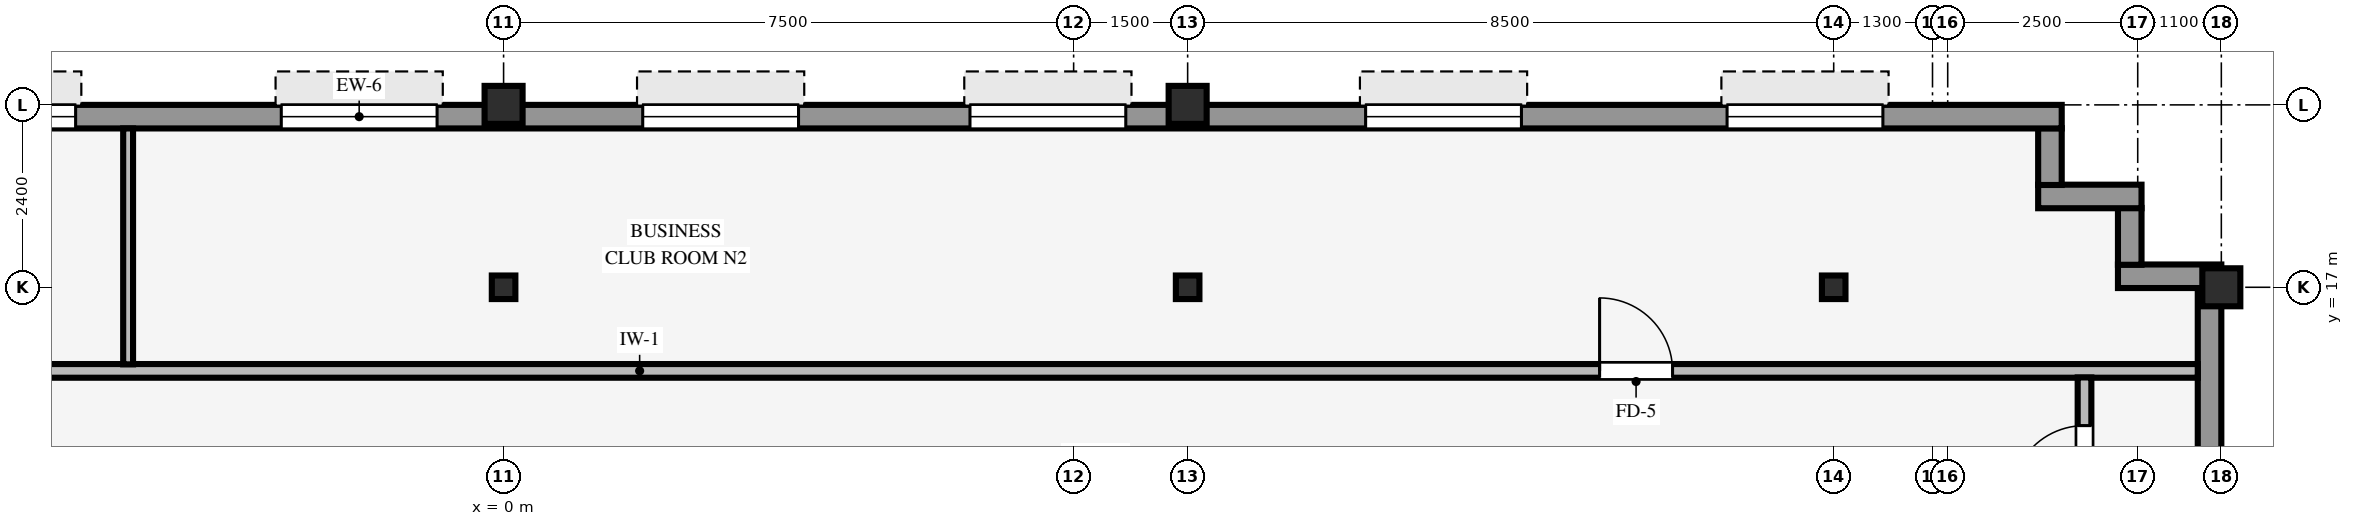
"""IFC4 building model, lengths in metres.
Left out: names, types, materials, properties, quantities, classifications, styles, units other than length and angle.
Written with IfcOpenShell. Run it as: python <this file> out.ifc"""

import sys

from ifc_helpers import new_model, si_unit, direction, frame, frame_2d, origin, origin_2d, place, context, subcontext, project, spatial, rectangle, hollow_rectangle, i_section, extrude, source, transform, mapped, element, fill, save


model = new_model("IFC4")
c1 = context("Model", 3, precision=1e-05, world=origin(), true_north=direction((0.0, 1.0)))
c2 = subcontext(c1, "Body", "Model", "MODEL_VIEW")
j1 = project(units=[si_unit("LENGTHUNIT", "METRE"), si_unit("PLANEANGLEUNIT", "RADIAN")], contexts=[c1])
p1 = place(None, origin())
s1 = spatial("IfcSite", under=j1, at=p1, CompositionType="ELEMENT")
p2 = place(p1, origin())
s2 = spatial("IfcBuilding", under=s1, at=p2, CompositionType="ELEMENT")
p3 = place(p2, frame((0.0, 0.0, 198.2)))
s3 = spatial("IfcBuildingStorey", under=s2, at=p3, CompositionType="ELEMENT", Elevation=198.2)
for number, where, z_axis, x_axis in (
    (1, (22.6, 17.0, 0.0), (0.0, 0.0, 1.0), (1.0, 0.0, 0.0)),
    (2, (0.0, 19.4, 0.0), (0.0, 0.0, 1.0), (1.0, 0.0, 0.0)),
    (3, (9.0, 19.4, 0.0), (0.0, 0.0, 1.0), (1.0, 0.0, 0.0)),
):
    element("IfcColumn", number, at=place(p3, frame(where, z_axis=z_axis, x_axis=x_axis)), inside=s3, PredefinedType="COLUMN", context=c2, shape_type="SweptSolid", body=[
        extrude(hollow_rectangle(XDim=0.5, YDim=0.5, WallThickness=0.032, InnerFilletRadius=0.032, OuterFilletRadius=0.064, at=origin_2d()), origin(), (0.0, 0.0, 1.0), 3.37),
    ])
for number, where, z_axis, x_axis in (
    (4, (0.0, 17.0, 0.0), (0.0, 0.0, 1.0), (1.0, 0.0, 0.0)),
    (5, (9.0, 17.0, 0.0), (0.0, 0.0, 1.0), (1.0, 0.0, 0.0)),
    (6, (17.5, 17.0, 0.0), (0.0, 0.0, 1.0), (1.0, 0.0, 0.0)),
):
    element("IfcColumn", number, at=place(p3, frame(where, z_axis=z_axis, x_axis=x_axis)), inside=s3, PredefinedType="COLUMN", context=c2, shape_type="SweptSolid", body=[
        extrude(i_section(OverallWidth=0.31, OverallDepth=0.31, WebThickness=0.015, FlangeThickness=0.015, FilletRadius=0.015, at=origin_2d()), origin(), (0.0, 0.0, 1.0), 3.37),
    ])
p4 = place(p3, frame((22.445, -20.794, 0.0), z_axis=(0.0, 0.0, 1.0), x_axis=(0.0, 1.0, 0.0)))
e7 = element("IfcWall", 7, at=p4, inside=s3, PredefinedType="STANDARD", context=c2, shape_type="SweptSolid", body=[
    extrude(rectangle(XDim=37.788, YDim=0.31, at=frame_2d((18.894, 0.0))), origin(), (0.0, 0.0, 1.0), 2.705),
])
p5 = place(p4, frame((16.474, 0.0, 0.0), z_axis=(0.0, 0.0, 1.0), x_axis=(-1.0, 0.0, 0.0)))
e8 = element("IfcOpeningElement", 8, at=p5, cuts=e7, PredefinedType="OPENING", context=c2, shape_type="SweptSolid", body=[
    extrude(rectangle(XDim=0.98, YDim=2.15, at=frame_2d((0.49, 1.075))), frame((0.0, 0.165, 0.0), z_axis=(0.0, -1.0, 0.0), x_axis=(1.0, 0.0, 0.0)), (0.0, 0.0, 1.0), 0.33),
])
p6 = place(p4, frame((1.581, 0.0, 0.8)))
e9 = element("IfcOpeningElement", 9, at=p6, cuts=e7, PredefinedType="OPENING", context=c2, shape_type="SweptSolid", body=[
    extrude(rectangle(XDim=1.25, YDim=1.52, at=frame_2d((0.625, 0.76))), frame((0.0, 0.165, 0.0), z_axis=(0.0, -1.0, 0.0), x_axis=(1.0, 0.0, 0.0)), (0.0, 0.0, 1.0), 0.33),
])
p7 = place(p4, frame((8.044, 0.0, 0.8)))
e10 = element("IfcOpeningElement", 10, at=p7, cuts=e7, PredefinedType="OPENING", context=c2, shape_type="SweptSolid", body=[
    extrude(rectangle(XDim=1.25, YDim=1.52, at=frame_2d((0.625, 0.76))), frame((0.0, 0.165, 0.0), z_axis=(0.0, -1.0, 0.0), x_axis=(1.0, 0.0, 0.0)), (0.0, 0.0, 1.0), 0.33),
])
p8 = place(p4, frame((13.156, 0.0, 0.8)))
e11 = element("IfcOpeningElement", 11, at=p8, cuts=e7, PredefinedType="OPENING", context=c2, shape_type="SweptSolid", body=[
    extrude(rectangle(XDim=1.25, YDim=1.52, at=frame_2d((0.625, 0.76))), frame((0.0, 0.165, 0.0), z_axis=(0.0, -1.0, 0.0), x_axis=(1.0, 0.0, 0.0)), (0.0, 0.0, 1.0), 0.33),
])
p9 = place(p4, frame((18.269, 0.0, 0.8)))
e12 = element("IfcOpeningElement", 12, at=p9, cuts=e7, PredefinedType="OPENING", context=c2, shape_type="SweptSolid", body=[
    extrude(rectangle(XDim=1.25, YDim=1.52, at=frame_2d((0.625, 0.76))), frame((0.0, 0.165, 0.0), z_axis=(0.0, -1.0, 0.0), x_axis=(1.0, 0.0, 0.0)), (0.0, 0.0, 1.0), 0.33),
])
p10 = place(p4, frame((22.482, 0.0, 0.8)))
e13 = element("IfcOpeningElement", 13, at=p10, cuts=e7, PredefinedType="OPENING", context=c2, shape_type="SweptSolid", body=[
    extrude(rectangle(XDim=1.25, YDim=1.52, at=frame_2d((0.625, 0.76))), frame((0.0, 0.165, 0.0), z_axis=(0.0, -1.0, 0.0), x_axis=(1.0, 0.0, 0.0)), (0.0, 0.0, 1.0), 0.33),
])
p11 = place(p4, frame((28.044, 0.0, 0.8)))
e14 = element("IfcOpeningElement", 14, at=p11, cuts=e7, PredefinedType="OPENING", context=c2, shape_type="SweptSolid", body=[
    extrude(rectangle(XDim=1.25, YDim=1.52, at=frame_2d((0.625, 0.76))), frame((0.0, 0.165, 0.0), z_axis=(0.0, -1.0, 0.0), x_axis=(1.0, 0.0, 0.0)), (0.0, 0.0, 1.0), 0.33),
])
p12 = place(p4, frame((33.607, 0.0, 0.8)))
e15 = element("IfcOpeningElement", 15, at=p12, cuts=e7, PredefinedType="OPENING", context=c2, shape_type="SweptSolid", body=[
    extrude(rectangle(XDim=1.25, YDim=1.52, at=frame_2d((0.625, 0.76))), frame((0.0, 0.165, 0.0), z_axis=(0.0, -1.0, 0.0), x_axis=(1.0, 0.0, 0.0)), (0.0, 0.0, 1.0), 0.33),
])
p13 = place(p3, frame((21.24, 17.145, 0.0), z_axis=(0.0, 0.0, 1.0), x_axis=(1.0, 0.0, 0.0)))
e16 = element("IfcWall", 16, at=p13, inside=s3, PredefinedType="STANDARD", context=c2, shape_type="SweptSolid", body=[
    extrude(rectangle(XDim=1.36, YDim=0.31, at=frame_2d((0.68, 0.0))), origin(), (0.0, 0.0, 1.0), 2.816),
])
p14 = place(p3, frame((21.395, 17.296, 0.0), z_axis=(0.0, 0.0, 1.0), x_axis=(0.0, 1.0, 0.0)))
e17 = element("IfcWall", 17, at=p14, inside=s3, PredefinedType="STANDARD", context=c2, shape_type="SweptSolid", body=[
    extrude(rectangle(XDim=0.748, YDim=0.31, at=frame_2d((0.374, 0.0))), origin(), (0.0, 0.0, 1.0), 2.816),
])
p15 = place(p3, frame((20.19, 18.195, 0.0), z_axis=(0.0, 0.0, 1.0), x_axis=(1.0, 0.0, 0.0)))
e18 = element("IfcWall", 18, at=p15, inside=s3, PredefinedType="STANDARD", context=c2, shape_type="SweptSolid", body=[
    extrude(rectangle(XDim=1.36, YDim=0.31, at=frame_2d((0.68, 0.0))), origin(), (0.0, 0.0, 1.0), 2.816),
])
p16 = place(p3, frame((20.345, 18.346, 0.0), z_axis=(0.0, 0.0, 1.0), x_axis=(0.0, 1.0, 0.0)))
e19 = element("IfcWall", 19, at=p16, inside=s3, PredefinedType="STANDARD", context=c2, shape_type="SweptSolid", body=[
    extrude(rectangle(XDim=0.748, YDim=0.31, at=frame_2d((0.374, 0.0))), origin(), (0.0, 0.0, 1.0), 2.816),
])
p17 = place(p3, frame((-24.3, 19.245, 0.0), z_axis=(0.0, 0.0, 1.0), x_axis=(1.0, 0.0, 0.0)))
e20 = element("IfcWall", 20, at=p17, inside=s3, PredefinedType="STANDARD", context=c2, shape_type="SweptSolid", body=[
    extrude(rectangle(XDim=44.8, YDim=0.31, at=frame_2d((22.4, 0.0))), origin(), (0.0, 0.0, 1.0), 2.705),
])
p18 = place(p17, frame((2.353, 0.0, 0.8)))
e21 = element("IfcOpeningElement", 21, at=p18, cuts=e20, PredefinedType="OPENING", context=c2, shape_type="SweptSolid", body=[
    extrude(rectangle(XDim=2.05, YDim=1.52, at=frame_2d((1.025, 0.76))), frame((0.0, 0.165, 0.0), z_axis=(0.0, -1.0, 0.0), x_axis=(1.0, 0.0, 0.0)), (0.0, 0.0, 1.0), 0.33),
])
p19 = place(p17, frame((7.108, 0.0, 0.8)))
e22 = element("IfcOpeningElement", 22, at=p19, cuts=e20, PredefinedType="OPENING", context=c2, shape_type="SweptSolid", body=[
    extrude(rectangle(XDim=2.05, YDim=1.52, at=frame_2d((1.025, 0.76))), frame((0.0, 0.165, 0.0), z_axis=(0.0, -1.0, 0.0), x_axis=(1.0, 0.0, 0.0)), (0.0, 0.0, 1.0), 0.33),
])
p20 = place(p17, frame((11.864, 0.0, 0.8)))
e23 = element("IfcOpeningElement", 23, at=p20, cuts=e20, PredefinedType="OPENING", context=c2, shape_type="SweptSolid", body=[
    extrude(rectangle(XDim=2.05, YDim=1.52, at=frame_2d((1.025, 0.76))), frame((0.0, 0.165, 0.0), z_axis=(0.0, -1.0, 0.0), x_axis=(1.0, 0.0, 0.0)), (0.0, 0.0, 1.0), 0.33),
])
p21 = place(p17, frame((16.619, 0.0, 0.8)))
e24 = element("IfcOpeningElement", 24, at=p21, cuts=e20, PredefinedType="OPENING", context=c2, shape_type="SweptSolid", body=[
    extrude(rectangle(XDim=2.05, YDim=1.52, at=frame_2d((1.025, 0.76))), frame((0.0, 0.165, 0.0), z_axis=(0.0, -1.0, 0.0), x_axis=(1.0, 0.0, 0.0)), (0.0, 0.0, 1.0), 0.33),
])
p22 = place(p17, frame((21.375, 0.0, 0.8)))
e25 = element("IfcOpeningElement", 25, at=p22, cuts=e20, PredefinedType="OPENING", context=c2, shape_type="SweptSolid", body=[
    extrude(rectangle(XDim=2.05, YDim=1.52, at=frame_2d((1.025, 0.76))), frame((0.0, 0.165, 0.0), z_axis=(0.0, -1.0, 0.0), x_axis=(1.0, 0.0, 0.0)), (0.0, 0.0, 1.0), 0.33),
])
p23 = place(p17, frame((26.131, 0.0, 0.8)))
e26 = element("IfcOpeningElement", 26, at=p23, cuts=e20, PredefinedType="OPENING", context=c2, shape_type="SweptSolid", body=[
    extrude(rectangle(XDim=2.05, YDim=1.52, at=frame_2d((1.025, 0.76))), frame((0.0, 0.165, 0.0), z_axis=(0.0, -1.0, 0.0), x_axis=(1.0, 0.0, 0.0)), (0.0, 0.0, 1.0), 0.33),
])
p24 = place(p17, frame((30.436, 0.0, 0.8)))
e27 = element("IfcOpeningElement", 27, at=p24, cuts=e20, PredefinedType="OPENING", context=c2, shape_type="SweptSolid", body=[
    extrude(rectangle(XDim=2.05, YDim=1.52, at=frame_2d((1.025, 0.76))), frame((0.0, 0.165, 0.0), z_axis=(0.0, -1.0, 0.0), x_axis=(1.0, 0.0, 0.0)), (0.0, 0.0, 1.0), 0.33),
])
p25 = place(p17, frame((35.642, 0.0, 0.8)))
e28 = element("IfcOpeningElement", 28, at=p25, cuts=e20, PredefinedType="OPENING", context=c2, shape_type="SweptSolid", body=[
    extrude(rectangle(XDim=2.05, YDim=1.52, at=frame_2d((1.025, 0.76))), frame((0.0, 0.165, 0.0), z_axis=(0.0, -1.0, 0.0), x_axis=(1.0, 0.0, 0.0)), (0.0, 0.0, 1.0), 0.33),
])
p26 = place(p17, frame((40.397, 0.0, 0.8)))
e29 = element("IfcOpeningElement", 29, at=p26, cuts=e20, PredefinedType="OPENING", context=c2, shape_type="SweptSolid", body=[
    extrude(rectangle(XDim=2.05, YDim=1.52, at=frame_2d((1.025, 0.76))), frame((0.0, 0.165, 0.0), z_axis=(0.0, -1.0, 0.0), x_axis=(1.0, 0.0, 0.0)), (0.0, 0.0, 1.0), 0.33),
])
p27 = place(p3, frame((-26.09, 15.9, 0.0), z_axis=(0.0, 0.0, 1.0), x_axis=(1.0, 0.0, 0.0)))
e30 = element("IfcWall", 30, at=p27, inside=s3, PredefinedType="PARTITIONING", context=c2, shape_type="SweptSolid", body=[
    extrude(rectangle(XDim=48.38, YDim=0.18, at=frame_2d((24.19, 0.0))), origin(), (0.0, 0.0, 1.0), 3.36),
])
p28 = place(p27, frame((14.29, 0.0, 0.0)))
e31 = element("IfcOpeningElement", 31, at=p28, cuts=e30, PredefinedType="OPENING", context=c2, shape_type="SweptSolid", body=[
    extrude(rectangle(XDim=0.96, YDim=2.1, at=frame_2d((0.48, 1.05))), frame((0.0, 0.1, 0.0), z_axis=(0.0, -1.0, 0.0), x_axis=(1.0, 0.0, 0.0)), (0.0, 0.0, 1.0), 0.2),
])
p29 = place(p27, frame((40.51, 0.0, 0.0)))
e32 = element("IfcOpeningElement", 32, at=p29, cuts=e30, PredefinedType="OPENING", context=c2, shape_type="SweptSolid", body=[
    extrude(rectangle(XDim=0.96, YDim=2.1, at=frame_2d((0.48, 1.05))), frame((0.0, 0.1, 0.0), z_axis=(0.0, -1.0, 0.0), x_axis=(1.0, 0.0, 0.0)), (0.0, 0.0, 1.0), 0.2),
])
p30 = place(p3, frame((-4.94, 15.986, 0.0), z_axis=(0.0, 0.0, 1.0), x_axis=(0.0, 1.0, 0.0)))
e33 = element("IfcWall", 33, at=p30, inside=s3, PredefinedType="PARTITIONING", context=c2, shape_type="SweptSolid", body=[
    extrude(rectangle(XDim=3.104, YDim=0.13, at=frame_2d((1.552, 0.0))), origin(), (0.0, 0.0, 1.0), 3.36),
])
p31 = place(p3, frame((20.8, 13.586, 0.0), z_axis=(0.0, 0.0, 1.0), x_axis=(0.0, 1.0, 0.0)))
e34 = element("IfcWall", 34, at=p31, inside=s3, PredefinedType="PARTITIONING", context=c2, shape_type="SweptSolid", body=[
    extrude(rectangle(XDim=2.228, YDim=0.18, at=frame_2d((1.114, 0.0))), origin(), (0.0, 0.0, 1.0), 3.36),
])
p32 = place(p31, frame((0.634, 0.0, 0.0)))
e35 = element("IfcOpeningElement", 35, at=p32, cuts=e34, PredefinedType="OPENING", context=c2, shape_type="SweptSolid", body=[
    extrude(rectangle(XDim=0.96, YDim=2.1, at=frame_2d((0.48, 1.05))), frame((0.0, 0.1, 0.0), z_axis=(0.0, -1.0, 0.0), x_axis=(1.0, 0.0, 0.0)), (0.0, 0.0, 1.0), 0.2),
])
m1 = source(origin(), c2, "Body", "SweptSolid", [
    extrude(rectangle(XDim=2.05, YDim=1.52, at=frame_2d((1.025, 0.76))), frame((0.0, 0.03, 0.0), z_axis=(0.0, -1.0, 0.0), x_axis=(1.0, 0.0, 0.0)), (0.0, 0.0, 1.0), 0.06),
])
p33 = place(p21, origin())
e36 = element("IfcWindow", 36, at=p33, inside=s3, PartitioningType="SINGLE_PANEL", PredefinedType="WINDOW", context=c2, shape_type="MappedRepresentation", body=[
    mapped(m1, transform((0.0, 0.0, 0.0), scale=1.0)),
])
fill(e24, e36)
p34 = place(p22, origin())
e37 = element("IfcWindow", 37, at=p34, inside=s3, PartitioningType="SINGLE_PANEL", PredefinedType="WINDOW", context=c2, shape_type="MappedRepresentation", body=[
    mapped(m1, transform((0.0, 0.0, 0.0), scale=1.0)),
])
fill(e25, e37)
p35 = place(p23, origin())
e38 = element("IfcWindow", 38, at=p35, inside=s3, PartitioningType="SINGLE_PANEL", PredefinedType="WINDOW", context=c2, shape_type="MappedRepresentation", body=[
    mapped(m1, transform((0.0, 0.0, 0.0), scale=1.0)),
])
fill(e26, e38)
p36 = place(p24, origin())
e39 = element("IfcWindow", 39, at=p36, inside=s3, PartitioningType="SINGLE_PANEL", PredefinedType="WINDOW", context=c2, shape_type="MappedRepresentation", body=[
    mapped(m1, transform((0.0, 0.0, 0.0), scale=1.0)),
])
fill(e27, e39)
p37 = place(p25, origin())
e40 = element("IfcWindow", 40, at=p37, inside=s3, PartitioningType="SINGLE_PANEL", PredefinedType="WINDOW", context=c2, shape_type="MappedRepresentation", body=[
    mapped(m1, transform((0.0, 0.0, 0.0), scale=1.0)),
])
fill(e28, e40)
p38 = place(p26, origin())
e41 = element("IfcWindow", 41, at=p38, inside=s3, PartitioningType="SINGLE_PANEL", PredefinedType="WINDOW", context=c2, shape_type="MappedRepresentation", body=[
    mapped(m1, transform((0.0, 0.0, 0.0), scale=1.0)),
])
fill(e29, e41)
m2 = source(origin(), c2, "Body", "SweptSolid", [
    extrude(rectangle(XDim=0.96, YDim=2.1, at=frame_2d((0.48, 1.05))), frame((0.0, 0.025, 0.0), z_axis=(0.0, -1.0, 0.0), x_axis=(1.0, 0.0, 0.0)), (0.0, 0.0, 1.0), 0.05),
])
p39 = place(p29, origin())
e42 = element("IfcDoor", 42, at=p39, inside=s3, OperationType="SINGLE_SWING_LEFT", PredefinedType="DOOR", context=c2, shape_type="MappedRepresentation", body=[
    mapped(m2, transform((0.0, 0.0, 0.0), scale=1.0)),
])
fill(e32, e42)
p40 = place(p32, origin())
e43 = element("IfcDoor", 43, at=p40, inside=s3, OperationType="SINGLE_SWING_LEFT", PredefinedType="DOOR", context=c2, shape_type="MappedRepresentation", body=[
    mapped(m2, transform((0.0, 0.0, 0.0), scale=1.0)),
])
fill(e35, e43)
save(model, sys.argv[1])
